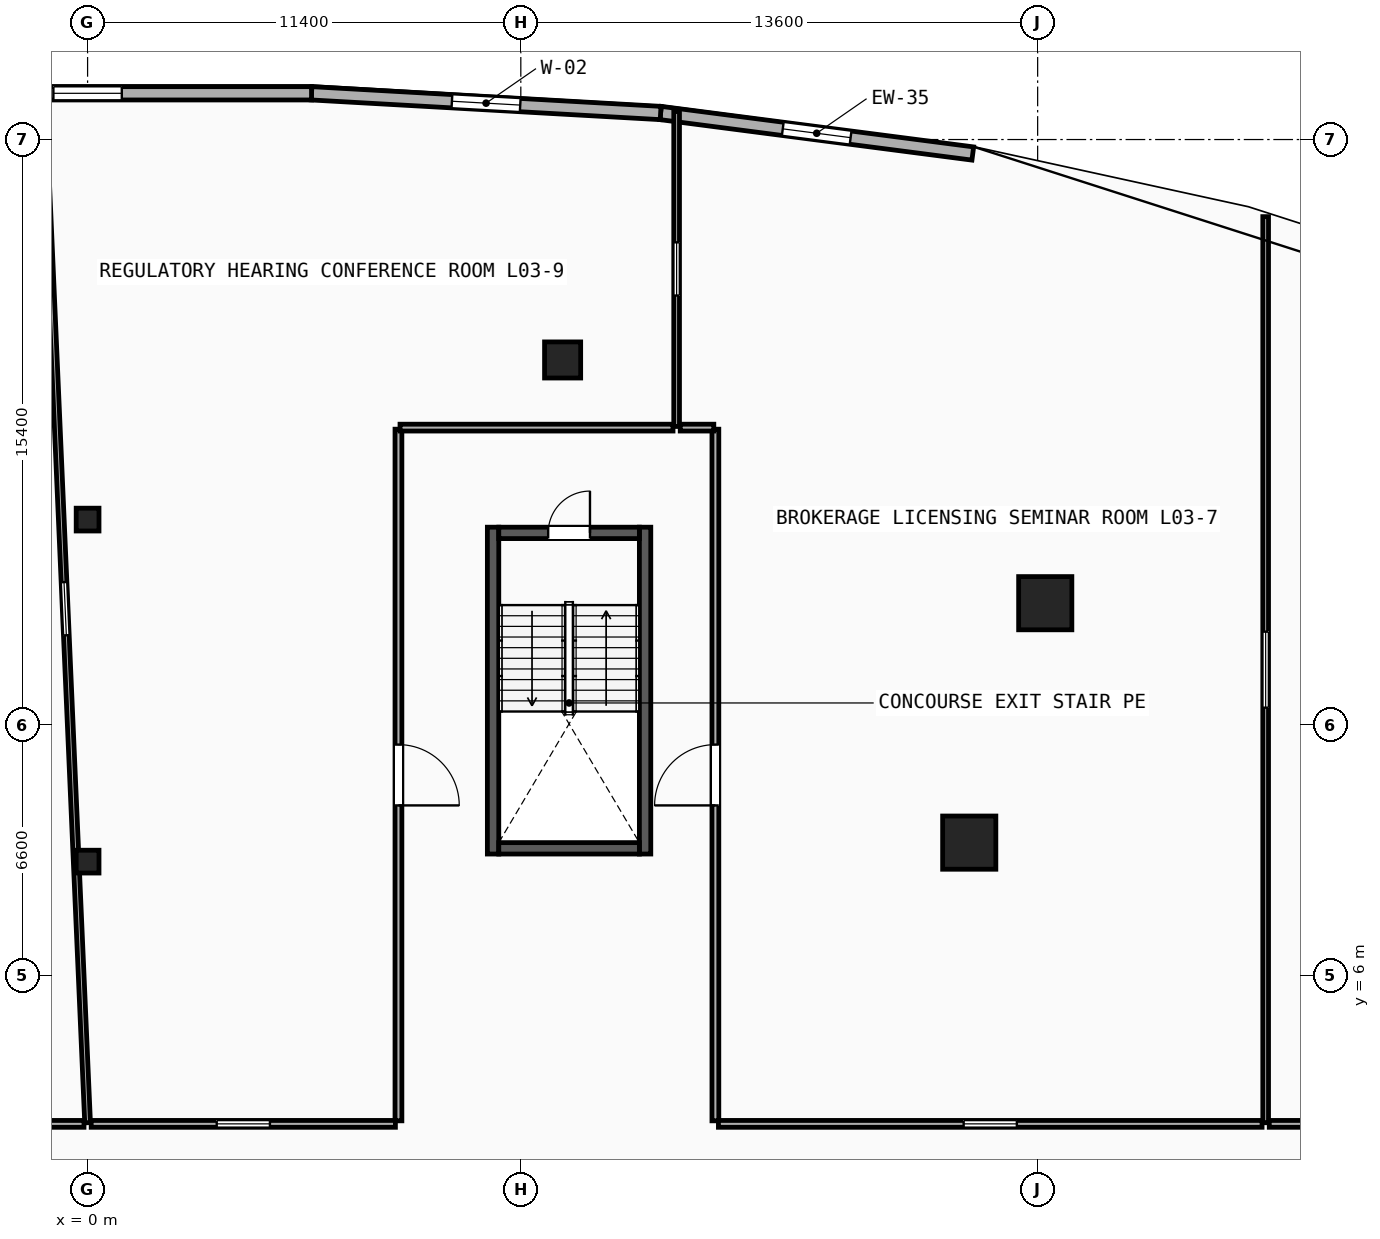
"""IFC4 building model, lengths in metres.
Left out: names, types, materials, properties, quantities, classifications, styles, units other than length and angle.
Written with IfcOpenShell. Run it as: python <this file> out.ifc"""

import sys

from ifc_helpers import new_model, si_unit, direction, frame, frame_2d, origin, origin_2d, place, context, subcontext, project, spatial, rectangle, hollow_rectangle, circle, extrude, element, fill, save


model = new_model("IFC4")
c1 = context("Model", 3, precision=1e-05, world=origin(), true_north=direction((0.0, 1.0)))
c2 = subcontext(c1, "Body", "Model", "MODEL_VIEW")
j1 = project(units=[si_unit("LENGTHUNIT", "METRE"), si_unit("PLANEANGLEUNIT", "RADIAN")], contexts=[c1])
p1 = place(None, origin())
s1 = spatial("IfcSite", under=j1, at=p1, CompositionType="ELEMENT")
p2 = place(p1, origin())
s2 = spatial("IfcBuilding", under=s1, at=p2, CompositionType="ELEMENT")
p3 = place(p2, frame((0.0, 0.0, 16.0)))
s3 = spatial("IfcBuildingStorey", under=s2, at=p3, CompositionType="ELEMENT", Elevation=16.0)
for number, where, z_axis, x_axis in (
    (1, (23.2, 9.5, 0.0), (0.0, 0.0, 1.0), (1.0, 0.0, 0.0)),
    (2, (25.2, 15.8, 0.0), (0.0, 0.0, 1.0), (1.0, 0.0, 0.0)),
):
    element("IfcColumn", number, at=place(p3, frame(where, z_axis=z_axis, x_axis=x_axis)), inside=s3, PredefinedType="COLUMN", context=c2, shape_type="SweptSolid", body=[
        extrude(rectangle(XDim=1.4, YDim=1.4, at=origin_2d()), origin(), (0.0, 0.0, 1.0), 4.0),
    ])
for number, where, z_axis, x_axis in (
    (3, (0.0, 9.0, 0.0), (0.0, 0.0, 1.0), (1.0, 0.0, 0.0)),
    (4, (0.0, 18.0, 0.0), (0.0, 0.0, 1.0), (1.0, 0.0, 0.0)),
):
    element("IfcColumn", number, at=place(p3, frame(where, z_axis=z_axis, x_axis=x_axis)), inside=s3, PredefinedType="COLUMN", context=c2, shape_type="SweptSolid", body=[
        extrude(hollow_rectangle(XDim=0.6, YDim=0.6, WallThickness=0.032, at=origin_2d()), origin(), (0.0, 0.0, 1.0), 4.0),
    ])
p4 = place(p3, frame((12.5, 22.2, 0.0), z_axis=(0.0, 0.0, 1.0), x_axis=(1.0, 0.0, 0.0)))
e5 = element("IfcColumn", 5, at=p4, inside=s3, PredefinedType="PILASTER", context=c2, shape_type="SweptSolid", body=[
    extrude(circle(Radius=0.475, at=origin_2d()), origin(), (0.0, 0.0, 1.0), 4.0),
])
p5 = place(p3, frame((23.293, 27.632, 0.0), z_axis=(0.0, 0.0, 1.0), x_axis=(-0.99168663472, 0.128676410104, 0.0)))
e6 = element("IfcWall", 6, at=p5, inside=s3, PredefinedType="SOLIDWALL", context=c2, shape_type="SweptSolid", body=[
    extrude(rectangle(XDim=8.284, YDim=0.35, at=frame_2d((4.142, 0.0))), origin(), (0.0, 0.0, 1.0), 3.65),
])
p6 = place(p5, frame((3.242, 0.0, 0.85)))
e7 = element("IfcOpeningElement", 7, at=p6, cuts=e6, PredefinedType="OPENING", context=c2, shape_type="SweptSolid", body=[
    extrude(rectangle(XDim=1.8, YDim=2.4, at=frame_2d((0.9, 1.2))), frame((0.0, 0.185, 0.0), z_axis=(0.0, -1.0, 0.0), x_axis=(1.0, 0.0, 0.0)), (0.0, 0.0, 1.0), 0.37),
])
p7 = place(p3, frame((15.079, 28.698, 0.0), z_axis=(0.0, 0.0, 1.0), x_axis=(-0.998413463137, 0.056307695976, 0.0)))
e8 = element("IfcWall", 8, at=p7, inside=s3, PredefinedType="SOLIDWALL", context=c2, shape_type="SweptSolid", body=[
    extrude(rectangle(XDim=9.201, YDim=0.35, at=frame_2d((4.6, 0.0))), origin(), (0.0, 0.0, 1.0), 3.65),
])
p8 = place(p7, frame((3.7, 0.0, 0.85)))
e9 = element("IfcOpeningElement", 9, at=p8, cuts=e8, PredefinedType="OPENING", context=c2, shape_type="SweptSolid", body=[
    extrude(rectangle(XDim=1.8, YDim=2.4, at=frame_2d((0.9, 1.2))), frame((0.0, 0.185, 0.0), z_axis=(0.0, -1.0, 0.0), x_axis=(1.0, 0.0, 0.0)), (0.0, 0.0, 1.0), 0.37),
])
p9 = place(p3, frame((5.893, 29.216, 0.0), z_axis=(0.0, 0.0, 1.0), x_axis=(-1.0, 0.0, 0.0)))
e10 = element("IfcWall", 10, at=p9, inside=s3, PredefinedType="SOLIDWALL", context=c2, shape_type="SweptSolid", body=[
    extrude(rectangle(XDim=11.785, YDim=0.35, at=frame_2d((5.893, 0.0))), origin(), (0.0, 0.0, 1.0), 3.65),
])
p10 = place(p9, frame((4.992, 0.0, 0.85)))
e11 = element("IfcOpeningElement", 11, at=p10, cuts=e10, PredefinedType="OPENING", context=c2, shape_type="SweptSolid", body=[
    extrude(rectangle(XDim=1.8, YDim=2.4, at=frame_2d((0.9, 1.2))), frame((0.0, 0.185, 0.0), z_axis=(0.0, -1.0, 0.0), x_axis=(1.0, 0.0, 0.0)), (0.0, 0.0, 1.0), 0.37),
])
for number, where, z_axis, x_axis in (
    (12, (10.67, 9.2, 0.0), (0.0, 0.0, 1.0), (0.0, 1.0, 0.0)),
    (13, (14.67, 9.2, 0.0), (0.0, 0.0, 1.0), (0.0, 1.0, 0.0)),
):
    element("IfcWall", number, at=place(p3, frame(where, z_axis=z_axis, x_axis=x_axis)), inside=s3, PredefinedType="SHEAR", context=c2, shape_type="SweptSolid", body=[
        extrude(rectangle(XDim=8.6, YDim=0.3, at=frame_2d((4.3, 0.0))), origin(), (0.0, 0.0, 1.0), 3.65),
    ])
p11 = place(p3, frame((10.82, 17.65, 0.0), z_axis=(0.0, 0.0, 1.0), x_axis=(1.0, 0.0, 0.0)))
e14 = element("IfcWall", 14, at=p11, inside=s3, PredefinedType="SHEAR", context=c2, shape_type="SweptSolid", body=[
    extrude(rectangle(XDim=3.7, YDim=0.3, at=frame_2d((1.85, 0.0))), origin(), (0.0, 0.0, 1.0), 3.65),
])
p12 = place(p11, frame((1.3, 0.0, 0.0)))
e15 = element("IfcOpeningElement", 15, at=p12, cuts=e14, PredefinedType="OPENING", context=c2, shape_type="SweptSolid", body=[
    extrude(rectangle(XDim=1.1, YDim=2.15, at=frame_2d((0.55, 1.075))), frame((0.0, 0.16, 0.0), z_axis=(0.0, -1.0, 0.0), x_axis=(1.0, 0.0, 0.0)), (0.0, 0.0, 1.0), 0.32),
])
p13 = place(p3, frame((10.82, 9.35, 0.0), z_axis=(0.0, 0.0, 1.0), x_axis=(1.0, 0.0, 0.0)))
e16 = element("IfcWall", 16, at=p13, inside=s3, PredefinedType="SHEAR", context=c2, shape_type="SweptSolid", body=[
    extrude(rectangle(XDim=3.7, YDim=0.3, at=frame_2d((1.85, 0.0))), origin(), (0.0, 0.0, 1.0), 3.65),
])
p14 = place(p3, frame((0.0, 2.13, 0.0), z_axis=(0.0, 0.0, 1.0), x_axis=(-0.043560875221, 0.999050774561, 0.0)))
e17 = element("IfcWall", 17, at=p14, inside=s3, PredefinedType="PARTITIONING", context=c2, shape_type="SweptSolid", body=[
    extrude(rectangle(XDim=27.076, YDim=0.15, at=frame_2d((13.538, 0.0))), origin(), (0.0, 0.0, 1.0), 2.877),
])
p15 = place(p14, frame((12.838, 0.0, 1.05)))
e18 = element("IfcOpeningElement", 18, at=p15, cuts=e17, PredefinedType="OPENING", context=c2, shape_type="SweptSolid", body=[
    extrude(rectangle(XDim=1.4, YDim=1.5, at=frame_2d((0.7, 0.75))), frame((0.0, 0.085, 0.0), z_axis=(0.0, -1.0, 0.0), x_axis=(1.0, 0.0, 0.0)), (0.0, 0.0, 1.0), 0.17),
])
p16 = place(p3, frame((15.5, 20.45, 0.0), z_axis=(0.0, 0.0, 1.0), x_axis=(0.0, 1.0, 0.0)))
e19 = element("IfcWall", 19, at=p16, inside=s3, PredefinedType="PARTITIONING", context=c2, shape_type="SweptSolid", body=[
    extrude(rectangle(XDim=8.29, YDim=0.15, at=frame_2d((4.145, 0.0))), origin(), (0.0, 0.0, 1.0), 3.65),
])
p17 = place(p16, frame((3.445, 0.0, 1.05)))
e20 = element("IfcOpeningElement", 20, at=p17, cuts=e19, PredefinedType="OPENING", context=c2, shape_type="SweptSolid", body=[
    extrude(rectangle(XDim=1.4, YDim=1.5, at=frame_2d((0.7, 0.75))), frame((0.0, 0.085, 0.0), z_axis=(0.0, -1.0, 0.0), x_axis=(1.0, 0.0, 0.0)), (0.0, 0.0, 1.0), 0.17),
])
p18 = place(p3, frame((31.0, 2.13, 0.0), z_axis=(0.0, 0.0, 1.0), x_axis=(0.0, 1.0, 0.0)))
e21 = element("IfcWall", 21, at=p18, inside=s3, PredefinedType="PARTITIONING", context=c2, shape_type="SweptSolid", body=[
    extrude(rectangle(XDim=23.841, YDim=0.15, at=frame_2d((11.921, 0.0))), origin(), (0.0, 0.0, 1.0), 3.65),
])
p19 = place(p18, frame((10.921, 0.0, 1.05)))
e22 = element("IfcOpeningElement", 22, at=p19, cuts=e21, PredefinedType="OPENING", context=c2, shape_type="SweptSolid", body=[
    extrude(rectangle(XDim=2.0, YDim=1.5, at=frame_2d((1.0, 0.75))), frame((0.0, 0.085, 0.0), z_axis=(0.0, -1.0, 0.0), x_axis=(1.0, 0.0, 0.0)), (0.0, 0.0, 1.0), 0.17),
])
p20 = place(p3, frame((35.479, 2.1, 0.0), z_axis=(0.0, 0.0, 1.0), x_axis=(-1.0, 0.0, 0.0)))
e23 = element("IfcWall", 23, at=p20, inside=s3, PredefinedType="PARTITIONING", context=c2, shape_type="SweptSolid", body=[
    extrude(rectangle(XDim=4.384, YDim=0.18, at=frame_2d((2.192, 0.0))), origin(), (0.0, 0.0, 1.0), 3.65),
])
p21 = place(p3, frame((16.52, 2.18, 0.0), z_axis=(0.0, 0.0, 1.0), x_axis=(0.0, 1.0, 0.0)))
e24 = element("IfcWall", 24, at=p21, inside=s3, PredefinedType="PARTITIONING", context=c2, shape_type="SweptSolid", body=[
    extrude(rectangle(XDim=18.198, YDim=0.18, at=frame_2d((9.099, 0.0))), origin(), (0.0, 0.0, 1.0), 3.65),
])
p22 = place(p21, frame((8.299, 0.0, 0.0)))
e25 = element("IfcOpeningElement", 25, at=p22, cuts=e24, PredefinedType="OPENING", context=c2, shape_type="SweptSolid", body=[
    extrude(rectangle(XDim=1.6, YDim=2.2, at=frame_2d((0.8, 1.1))), frame((0.0, 0.1, 0.0), z_axis=(0.0, -1.0, 0.0), x_axis=(1.0, 0.0, 0.0)), (0.0, 0.0, 1.0), 0.2),
])
p23 = place(p3, frame((30.905, 2.1, 0.0), z_axis=(0.0, 0.0, 1.0), x_axis=(-1.0, 0.0, 0.0)))
e26 = element("IfcWall", 26, at=p23, inside=s3, PredefinedType="PARTITIONING", context=c2, shape_type="SweptSolid", body=[
    extrude(rectangle(XDim=14.305, YDim=0.18, at=frame_2d((7.152, 0.0))), origin(), (0.0, 0.0, 1.0), 3.65),
])
p24 = place(p23, frame((6.452, 0.0, 1.05)))
e27 = element("IfcOpeningElement", 27, at=p24, cuts=e26, PredefinedType="OPENING", context=c2, shape_type="SweptSolid", body=[
    extrude(rectangle(XDim=1.4, YDim=1.5, at=frame_2d((0.7, 0.75))), frame((0.0, 0.1, 0.0), z_axis=(0.0, -1.0, 0.0), x_axis=(1.0, 0.0, 0.0)), (0.0, 0.0, 1.0), 0.2),
])
p25 = place(p3, frame((16.479, 20.42, 0.0), z_axis=(0.0, 0.0, 1.0), x_axis=(-1.0, 0.0, 0.0)))
e28 = element("IfcWall", 28, at=p25, inside=s3, PredefinedType="PARTITIONING", context=c2, shape_type="SweptSolid", body=[
    extrude(rectangle(XDim=0.884, YDim=0.18, at=frame_2d((0.442, 0.0))), origin(), (0.0, 0.0, 1.0), 3.65),
])
p26 = place(p3, frame((-0.095, 2.1, 0.0), z_axis=(0.0, 0.0, 1.0), x_axis=(-1.0, 0.0, 0.0)))
e29 = element("IfcWall", 29, at=p26, inside=s3, PredefinedType="PARTITIONING", context=c2, shape_type="SweptSolid", body=[
    extrude(rectangle(XDim=15.31, YDim=0.18, at=frame_2d((7.655, 0.0))), origin(), (0.0, 0.0, 1.0), 2.877),
])
p27 = place(p26, frame((6.855, 0.0, 0.0)))
e30 = element("IfcOpeningElement", 30, at=p27, cuts=e29, PredefinedType="OPENING", context=c2, shape_type="SweptSolid", body=[
    extrude(rectangle(XDim=1.6, YDim=2.2, at=frame_2d((0.8, 1.1))), frame((0.0, 0.1, 0.0), z_axis=(0.0, -1.0, 0.0), x_axis=(1.0, 0.0, 0.0)), (0.0, 0.0, 1.0), 0.2),
])
p28 = place(p3, frame((8.18, 20.378, 0.0), z_axis=(0.0, 0.0, 1.0), x_axis=(0.0, -1.0, 0.0)))
e31 = element("IfcWall", 31, at=p28, inside=s3, PredefinedType="PARTITIONING", context=c2, shape_type="SweptSolid", body=[
    extrude(rectangle(XDim=18.198, YDim=0.18, at=frame_2d((9.099, 0.0))), origin(), (0.0, 0.0, 1.0), 3.65),
])
p29 = place(p28, frame((8.299, 0.0, 0.0)))
e32 = element("IfcOpeningElement", 32, at=p29, cuts=e31, PredefinedType="OPENING", context=c2, shape_type="SweptSolid", body=[
    extrude(rectangle(XDim=1.6, YDim=2.2, at=frame_2d((0.8, 1.1))), frame((0.0, 0.1, 0.0), z_axis=(0.0, -1.0, 0.0), x_axis=(1.0, 0.0, 0.0)), (0.0, 0.0, 1.0), 0.2),
])
p30 = place(p3, frame((8.1, 2.1, 0.0), z_axis=(0.0, 0.0, 1.0), x_axis=(-1.0, 0.0, 0.0)))
e33 = element("IfcWall", 33, at=p30, inside=s3, PredefinedType="PARTITIONING", context=c2, shape_type="SweptSolid", body=[
    extrude(rectangle(XDim=8.005, YDim=0.18, at=frame_2d((4.002, 0.0))), origin(), (0.0, 0.0, 1.0), 3.65),
])
p31 = place(p30, frame((3.302, 0.0, 1.05)))
e34 = element("IfcOpeningElement", 34, at=p31, cuts=e33, PredefinedType="OPENING", context=c2, shape_type="SweptSolid", body=[
    extrude(rectangle(XDim=1.4, YDim=1.5, at=frame_2d((0.7, 0.75))), frame((0.0, 0.1, 0.0), z_axis=(0.0, -1.0, 0.0), x_axis=(1.0, 0.0, 0.0)), (0.0, 0.0, 1.0), 0.2),
])
p32 = place(p3, frame((15.405, 20.42, 0.0), z_axis=(0.0, 0.0, 1.0), x_axis=(-1.0, 0.0, 0.0)))
e35 = element("IfcWall", 35, at=p32, inside=s3, PredefinedType="PARTITIONING", context=c2, shape_type="SweptSolid", body=[
    extrude(rectangle(XDim=7.184, YDim=0.18, at=frame_2d((3.592, 0.0))), origin(), (0.0, 0.0, 1.0), 3.65),
])
p33 = place(p6, origin())
e36 = element("IfcWindow", 36, at=p33, inside=s3, PartitioningType="SINGLE_PANEL", PredefinedType="WINDOW", context=c2, shape_type="SweptSolid", body=[
    extrude(rectangle(XDim=1.8, YDim=2.4, at=frame_2d((0.9, 1.2))), frame((0.0, 0.03, 0.0), z_axis=(0.0, -1.0, 0.0), x_axis=(1.0, 0.0, 0.0)), (0.0, 0.0, 1.0), 0.06),
])
fill(e7, e36)
p34 = place(p8, origin())
e37 = element("IfcWindow", 37, at=p34, inside=s3, PartitioningType="SINGLE_PANEL", PredefinedType="WINDOW", context=c2, shape_type="SweptSolid", body=[
    extrude(rectangle(XDim=1.8, YDim=2.4, at=frame_2d((0.9, 1.2))), frame((0.0, 0.03, 0.0), z_axis=(0.0, -1.0, 0.0), x_axis=(1.0, 0.0, 0.0)), (0.0, 0.0, 1.0), 0.06),
])
fill(e9, e37)
p35 = place(p10, origin())
e38 = element("IfcWindow", 38, at=p35, inside=s3, PartitioningType="SINGLE_PANEL", PredefinedType="WINDOW", context=c2, shape_type="SweptSolid", body=[
    extrude(rectangle(XDim=1.8, YDim=2.4, at=frame_2d((0.9, 1.2))), frame((0.0, 0.03, 0.0), z_axis=(0.0, -1.0, 0.0), x_axis=(1.0, 0.0, 0.0)), (0.0, 0.0, 1.0), 0.06),
])
fill(e11, e38)
p36 = place(p12, origin())
e39 = element("IfcDoor", 39, at=p36, inside=s3, OperationType="SINGLE_SWING_RIGHT", PredefinedType="DOOR", context=c2, shape_type="SweptSolid", body=[
    extrude(rectangle(XDim=1.1, YDim=2.15, at=frame_2d((0.55, 1.075))), frame((0.0, 0.025, 0.0), z_axis=(0.0, -1.0, 0.0), x_axis=(1.0, 0.0, 0.0)), (0.0, 0.0, 1.0), 0.05),
])
fill(e15, e39)
p37 = place(p22, origin())
e40 = element("IfcDoor", 40, at=p37, inside=s3, OperationType="SINGLE_SWING_LEFT", PredefinedType="DOOR", context=c2, shape_type="SweptSolid", body=[
    extrude(rectangle(XDim=1.6, YDim=2.2, at=frame_2d((0.8, 1.1))), frame((0.0, 0.025, 0.0), z_axis=(0.0, -1.0, 0.0), x_axis=(1.0, 0.0, 0.0)), (0.0, 0.0, 1.0), 0.05),
])
fill(e25, e40)
p38 = place(p29, origin())
e41 = element("IfcDoor", 41, at=p38, inside=s3, OperationType="SINGLE_SWING_RIGHT", PredefinedType="DOOR", context=c2, shape_type="SweptSolid", body=[
    extrude(rectangle(XDim=1.6, YDim=2.2, at=frame_2d((0.8, 1.1))), frame((0.0, 0.025, 0.0), z_axis=(0.0, -1.0, 0.0), x_axis=(1.0, 0.0, 0.0)), (0.0, 0.0, 1.0), 0.05),
])
fill(e32, e41)
p39 = place(p15, origin())
e42 = element("IfcWindow", 42, at=p39, inside=s3, PartitioningType="SINGLE_PANEL", PredefinedType="WINDOW", context=c2, shape_type="SweptSolid", body=[
    extrude(rectangle(XDim=1.4, YDim=1.5, at=frame_2d((0.7, 0.75))), frame((0.0, 0.03, 0.0), z_axis=(0.0, -1.0, 0.0), x_axis=(1.0, 0.0, 0.0)), (0.0, 0.0, 1.0), 0.06),
])
fill(e18, e42)
p40 = place(p17, origin())
e43 = element("IfcWindow", 43, at=p40, inside=s3, PartitioningType="SINGLE_PANEL", PredefinedType="WINDOW", context=c2, shape_type="SweptSolid", body=[
    extrude(rectangle(XDim=1.4, YDim=1.5, at=frame_2d((0.7, 0.75))), frame((0.0, 0.03, 0.0), z_axis=(0.0, -1.0, 0.0), x_axis=(1.0, 0.0, 0.0)), (0.0, 0.0, 1.0), 0.06),
])
fill(e20, e43)
p41 = place(p19, origin())
e44 = element("IfcWindow", 44, at=p41, inside=s3, PartitioningType="SINGLE_PANEL", PredefinedType="WINDOW", context=c2, shape_type="SweptSolid", body=[
    extrude(rectangle(XDim=2.0, YDim=1.5, at=frame_2d((1.0, 0.75))), frame((0.0, 0.03, 0.0), z_axis=(0.0, -1.0, 0.0), x_axis=(1.0, 0.0, 0.0)), (0.0, 0.0, 1.0), 0.06),
])
fill(e22, e44)
p42 = place(p24, origin())
e45 = element("IfcWindow", 45, at=p42, inside=s3, PartitioningType="SINGLE_PANEL", PredefinedType="WINDOW", context=c2, shape_type="SweptSolid", body=[
    extrude(rectangle(XDim=1.4, YDim=1.5, at=frame_2d((0.7, 0.75))), frame((0.0, 0.03, 0.0), z_axis=(0.0, -1.0, 0.0), x_axis=(1.0, 0.0, 0.0)), (0.0, 0.0, 1.0), 0.06),
])
fill(e27, e45)
p43 = place(p31, origin())
e46 = element("IfcWindow", 46, at=p43, inside=s3, PartitioningType="SINGLE_PANEL", PredefinedType="WINDOW", context=c2, shape_type="SweptSolid", body=[
    extrude(rectangle(XDim=1.4, YDim=1.5, at=frame_2d((0.7, 0.75))), frame((0.0, 0.03, 0.0), z_axis=(0.0, -1.0, 0.0), x_axis=(1.0, 0.0, 0.0)), (0.0, 0.0, 1.0), 0.06),
])
fill(e34, e46)
save(model, sys.argv[1])
